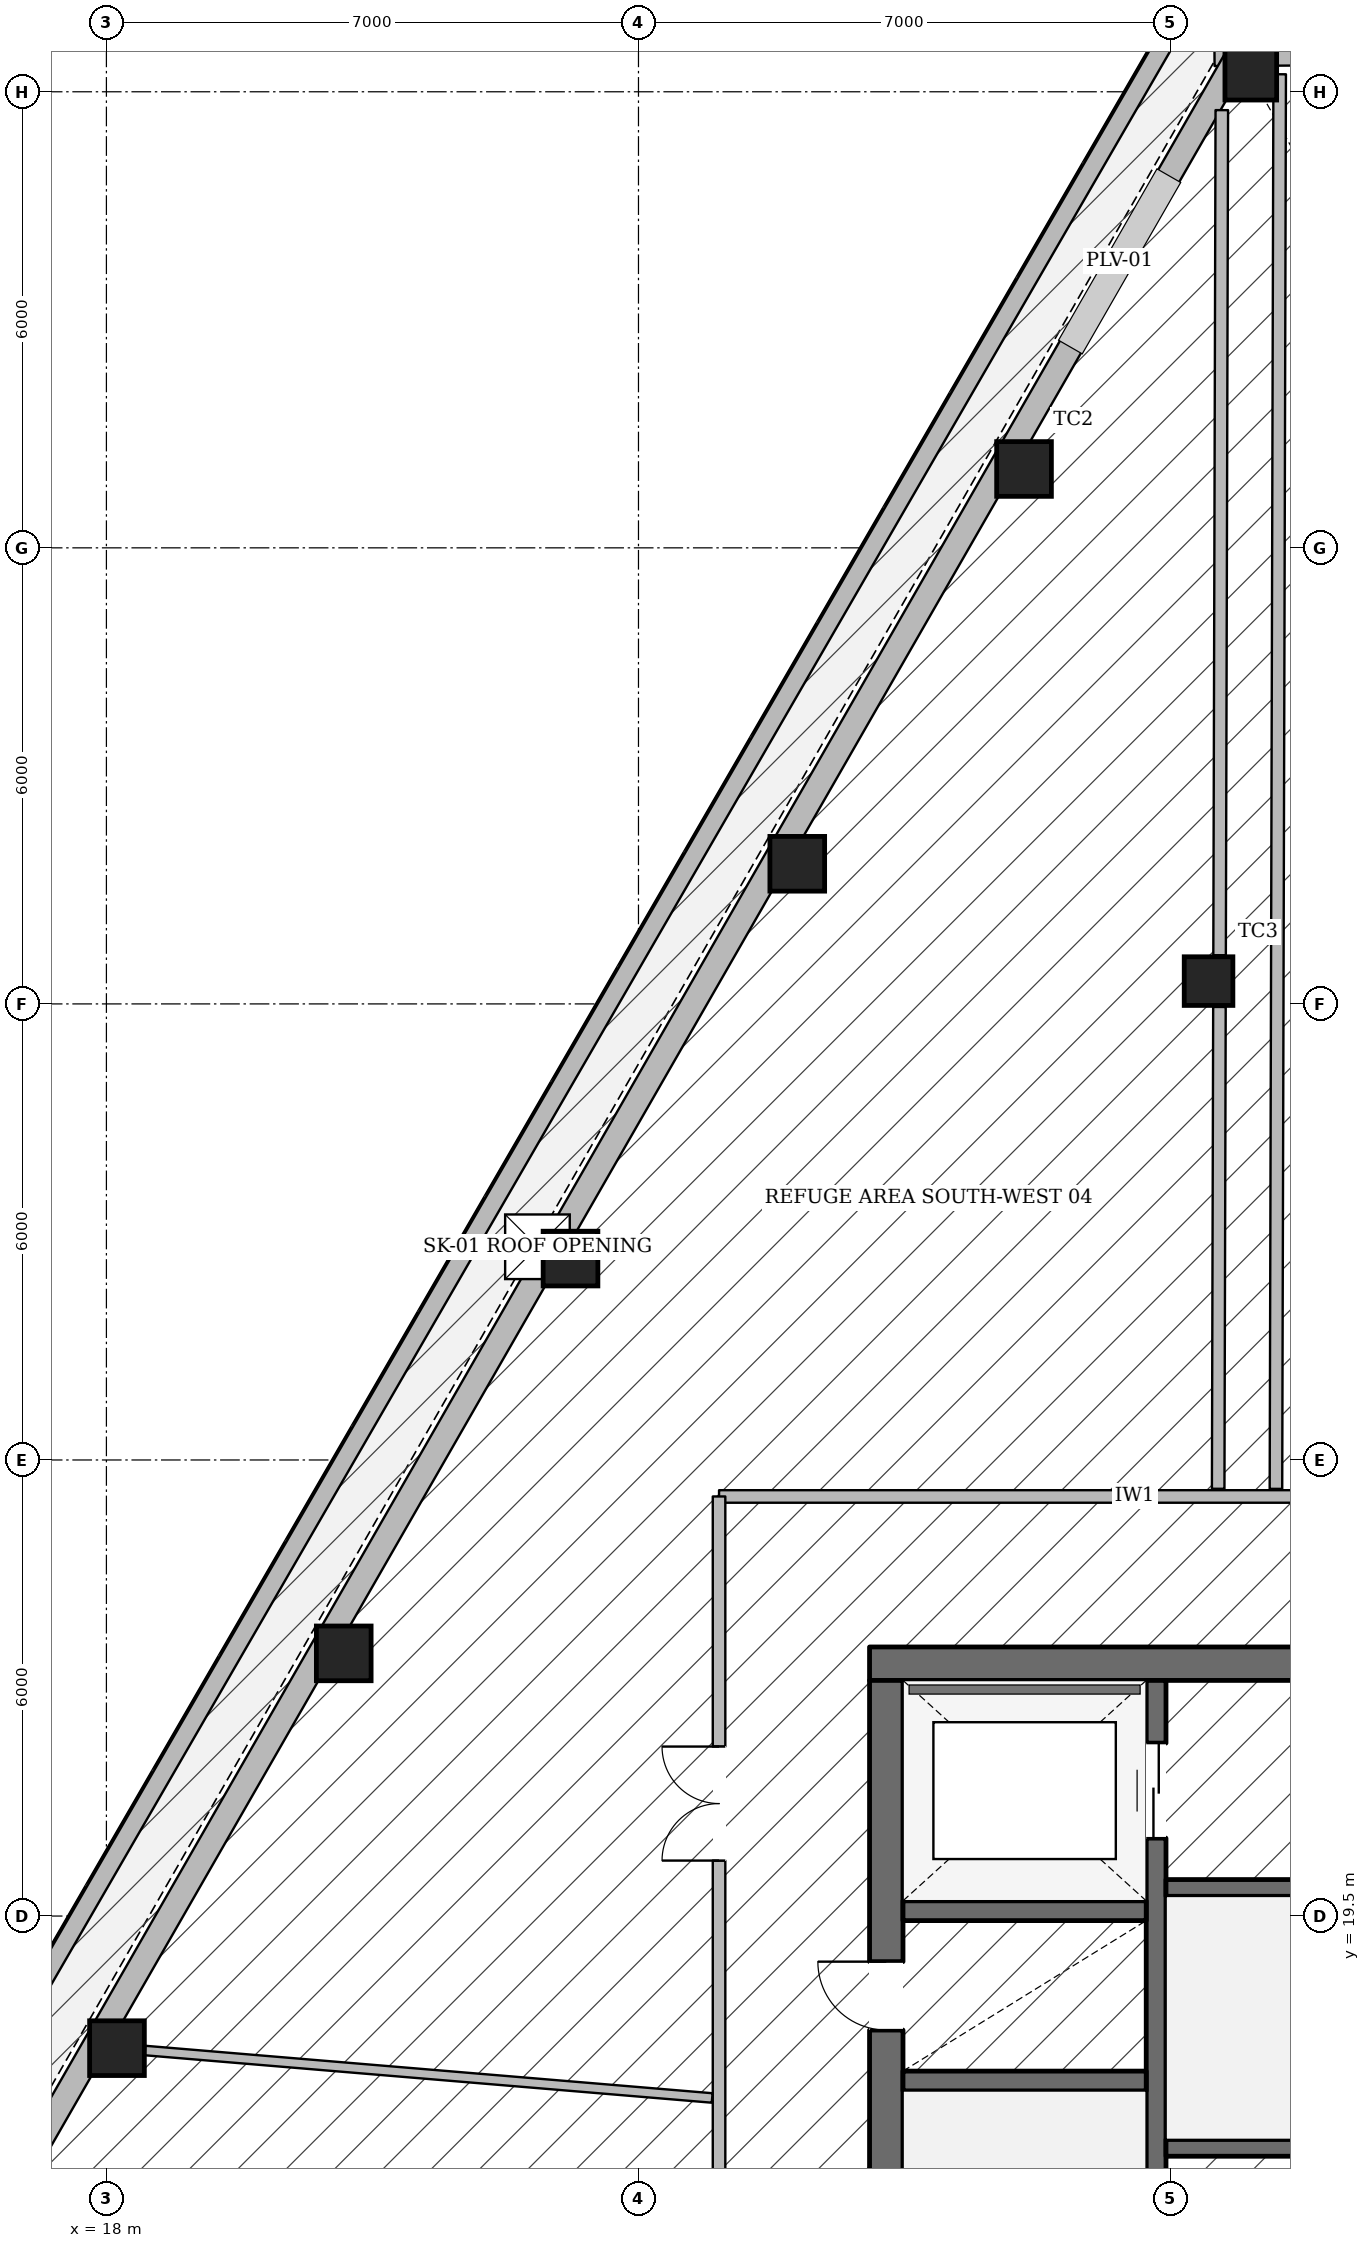
"""IFC4 building model, lengths in metres.
Left out: names, types, materials, properties, quantities, classifications, styles, units other than length and angle.
Written with IfcOpenShell. Run it as: python <this file> out.ifc"""

import sys

from ifc_helpers import new_model, si_unit, direction, frame, frame_2d, origin, origin_2d, place, context, subcontext, project, spatial, rectangle, hollow_rectangle, extrude, element, fill, save


model = new_model("IFC4")
c1 = context("Model", 3, precision=1e-05, world=origin(), true_north=direction((0.0, 1.0)))
c2 = subcontext(c1, "Body", "Model", "MODEL_VIEW")
j1 = project(units=[si_unit("LENGTHUNIT", "METRE"), si_unit("PLANEANGLEUNIT", "RADIAN")], contexts=[c1])
p1 = place(None, origin())
s1 = spatial("IfcSite", under=j1, at=p1, CompositionType="ELEMENT")
p2 = place(p1, origin())
s2 = spatial("IfcBuilding", under=s1, at=p2, CompositionType="ELEMENT")
p3 = place(p2, frame((0.0, 0.0, 154.8)))
s3 = spatial("IfcBuildingStorey", under=s2, at=p3, CompositionType="ELEMENT", Elevation=154.8)
p4 = place(p3, frame((28.04, 22.82, 0.0), z_axis=(0.0, 0.0, 1.0), x_axis=(1.0, 0.0, 0.0)))
e1 = element("IfcWall", 1, at=p4, inside=s3, PredefinedType="SOLIDWALL", context=c2, shape_type="SweptSolid", body=[
    extrude(rectangle(XDim=19.92, YDim=0.44, at=frame_2d((9.96, 0.0))), origin(), (0.0, 0.0, 1.0), 4.985),
])
p5 = place(p4, frame((6.235, 0.0, 0.0)))
e2 = element("IfcOpeningElement", 2, at=p5, cuts=e1, PredefinedType="OPENING", context=c2, shape_type="SweptSolid", body=[
    extrude(rectangle(XDim=1.05, YDim=2.15, at=frame_2d((0.525, 1.075))), frame((0.0, 0.23, 0.0), z_axis=(0.0, -1.0, 0.0), x_axis=(1.0, 0.0, 0.0)), (0.0, 0.0, 1.0), 0.46),
])
p6 = place(p4, frame((12.635, 0.0, 0.0)))
e3 = element("IfcOpeningElement", 3, at=p6, cuts=e1, PredefinedType="OPENING", context=c2, shape_type="SweptSolid", body=[
    extrude(rectangle(XDim=1.05, YDim=2.15, at=frame_2d((0.525, 1.075))), frame((0.0, 0.23, 0.0), z_axis=(0.0, -1.0, 0.0), x_axis=(1.0, 0.0, 0.0)), (0.0, 0.0, 1.0), 0.46),
])
p7 = place(p3, frame((28.26, 9.6, 0.0), z_axis=(0.0, 0.0, 1.0), x_axis=(0.0, 1.0, 0.0)))
e4 = element("IfcWall", 4, at=p7, inside=s3, PredefinedType="SOLIDWALL", context=c2, shape_type="SweptSolid", body=[
    extrude(rectangle(XDim=13.0, YDim=0.44, at=frame_2d((6.5, 0.0))), origin(), (0.0, 0.0, 1.0), 4.985),
])
p8 = place(p7, frame((0.2, 0.0, 0.0)))
e5 = element("IfcOpeningElement", 5, at=p8, cuts=e4, PredefinedType="OPENING", context=c2, shape_type="SweptSolid", body=[
    extrude(rectangle(XDim=1.1, YDim=2.15, at=frame_2d((0.55, 1.075))), frame((0.0, 0.23, 0.0), z_axis=(0.0, -1.0, 0.0), x_axis=(1.0, 0.0, 0.0)), (0.0, 0.0, 1.0), 0.46),
])
p9 = place(p7, frame((8.4, 0.0, 0.0)))
e6 = element("IfcOpeningElement", 6, at=p9, cuts=e4, PredefinedType="OPENING", context=c2, shape_type="SweptSolid", body=[
    extrude(rectangle(XDim=0.9, YDim=2.1, at=frame_2d((0.45, 1.05))), frame((0.0, 0.23, 0.0), z_axis=(0.0, -1.0, 0.0), x_axis=(1.0, 0.0, 0.0)), (0.0, 0.0, 1.0), 0.46),
])
p10 = place(p3, frame((31.81, 9.6, 0.0), z_axis=(0.0, 0.0, 1.0), x_axis=(0.0, 1.0, 0.0)))
e7 = element("IfcWall", 7, at=p10, inside=s3, PredefinedType="SHEAR", context=c2, shape_type="SweptSolid", body=[
    extrude(rectangle(XDim=13.0, YDim=0.26, at=frame_2d((6.5, 0.0))), origin(), (0.0, 0.0, 1.0), 4.985),
])
p11 = place(p10, frame((10.925, 0.0, 0.0)))
e8 = element("IfcOpeningElement", 8, at=p11, cuts=e7, PredefinedType="OPENING", context=c2, shape_type="SweptSolid", body=[
    extrude(rectangle(XDim=1.25, YDim=2.25, at=frame_2d((0.625, 1.125))), frame((0.0, 0.14, 0.0), z_axis=(0.0, -1.0, 0.0), x_axis=(1.0, 0.0, 0.0)), (0.0, 0.0, 1.0), 0.28),
])
for number, where, z_axis, x_axis in (
    (9, (28.48, 17.33, 0.0), (0.0, 0.0, 1.0), (1.0, 0.0, 0.0)),
    (10, (28.48, 19.57, 0.0), (0.0, 0.0, 1.0), (1.0, 0.0, 0.0)),
):
    element("IfcWall", number, at=place(p3, frame(where, z_axis=z_axis, x_axis=x_axis)), inside=s3, PredefinedType="SHEAR", context=c2, shape_type="SweptSolid", body=[
        extrude(rectangle(XDim=3.2, YDim=0.26, at=frame_2d((1.6, 0.0))), origin(), (0.0, 0.0, 1.0), 4.985),
    ])
p12 = place(p3, frame((31.94, 19.87, 0.0), z_axis=(0.0, 0.0, 1.0), x_axis=(1.0, 0.0, 0.0)))
e11 = element("IfcWall", 11, at=p12, inside=s3, PredefinedType="SOLIDWALL", context=c2, shape_type="SweptSolid", body=[
    extrude(rectangle(XDim=12.12, YDim=0.22, at=frame_2d((6.06, 0.0))), origin(), (0.0, 0.0, 1.0), 4.985),
])
p13 = place(p12, frame((6.3, 0.0, 0.0)))
e12 = element("IfcOpeningElement", 12, at=p13, cuts=e11, PredefinedType="OPENING", context=c2, shape_type="SweptSolid", body=[
    extrude(rectangle(XDim=1.1, YDim=2.15, at=frame_2d((0.55, 1.075))), frame((0.0, 0.12, 0.0), z_axis=(0.0, -1.0, 0.0), x_axis=(1.0, 0.0, 0.0)), (0.0, 0.0, 1.0), 0.24),
])
p14 = place(p12, frame((8.61, 0.0, 0.0)))
e13 = element("IfcOpeningElement", 13, at=p14, cuts=e11, PredefinedType="OPENING", context=c2, shape_type="SweptSolid", body=[
    extrude(rectangle(XDim=0.9, YDim=2.1, at=frame_2d((0.45, 1.05))), frame((0.0, 0.12, 0.0), z_axis=(0.0, -1.0, 0.0), x_axis=(1.0, 0.0, 0.0)), (0.0, 0.0, 1.0), 0.24),
])
p15 = place(p12, frame((10.85, 0.0, 0.0)))
e14 = element("IfcOpeningElement", 14, at=p15, cuts=e11, PredefinedType="OPENING", context=c2, shape_type="SweptSolid", body=[
    extrude(rectangle(XDim=0.9, YDim=2.1, at=frame_2d((0.45, 1.05))), frame((0.0, 0.12, 0.0), z_axis=(0.0, -1.0, 0.0), x_axis=(1.0, 0.0, 0.0)), (0.0, 0.0, 1.0), 0.24),
])
p16 = place(p3, frame((31.94, 16.45, 0.0), z_axis=(0.0, 0.0, 1.0), x_axis=(1.0, 0.0, 0.0)))
e15 = element("IfcWall", 15, at=p16, inside=s3, PredefinedType="SOLIDWALL", context=c2, shape_type="SweptSolid", body=[
    extrude(rectangle(XDim=12.12, YDim=0.22, at=frame_2d((6.06, 0.0))), origin(), (0.0, 0.0, 1.0), 4.985),
])
p17 = place(p3, frame((33.056, 43.731, 0.0), z_axis=(0.0, 0.0, 1.0), x_axis=(1.0, 0.0, 0.0)))
e16 = element("IfcColumn", 16, at=p17, inside=s3, PredefinedType="COLUMN", context=c2, shape_type="SweptSolid", body=[
    extrude(hollow_rectangle(XDim=0.68, YDim=0.68, WallThickness=0.03, at=origin_2d()), origin(), (0.0, 0.0, 1.0), 4.985),
])
for number, where, z_axis, x_axis in (
    (17, (30.073, 38.538, 0.0), (0.0, 0.0, 1.0), (1.0, 0.0, 0.0)),
    (18, (27.089, 33.344, 0.0), (0.0, 0.0, 1.0), (1.0, 0.0, 0.0)),
    (19, (24.106, 28.15, 0.0), (0.0, 0.0, 1.0), (1.0, 0.0, 0.0)),
    (20, (21.122, 22.956, 0.0), (0.0, 0.0, 1.0), (1.0, 0.0, 0.0)),
    (21, (18.139, 17.762, 0.0), (0.0, 0.0, 1.0), (1.0, 0.0, 0.0)),
):
    element("IfcColumn", number, at=place(p3, frame(where, z_axis=z_axis, x_axis=x_axis)), inside=s3, PredefinedType="COLUMN", context=c2, shape_type="SweptSolid", body=[
        extrude(hollow_rectangle(XDim=0.72, YDim=0.72, WallThickness=0.032, at=origin_2d()), origin(), (0.0, 0.0, 1.0), 4.985),
    ])
p18 = place(p3, frame((32.5, 31.8, 0.0), z_axis=(0.0, 0.0, 1.0), x_axis=(1.0, 0.0, 0.0)))
e22 = element("IfcColumn", 22, at=p18, inside=s3, PredefinedType="COLUMN", context=c2, shape_type="SweptSolid", body=[
    extrude(hollow_rectangle(XDim=0.64, YDim=0.64, WallThickness=0.028, at=origin_2d()), origin(), (0.0, 0.0, 1.0), 4.985),
])
p19 = place(p3, frame((32.578, 43.999, 0.0), z_axis=(0.0, 0.0, 1.0), x_axis=(0.999981011768, 0.006162475365, 0.0)))
e23 = element("IfcWall", 23, at=p19, inside=s3, PredefinedType="STANDARD", context=c2, shape_type="SweptSolid", body=[
    extrude(rectangle(XDim=10.736, YDim=0.32, at=frame_2d((5.368, 0.0))), origin(), (0.0, 0.0, 1.0), 3.677),
])
p20 = place(p3, frame((14.686, 12.292, 0.0), z_axis=(0.0, 0.0, 1.0), x_axis=(0.498068556708, 0.867137655057, 0.0)))
e24 = element("IfcWall", 24, at=p20, inside=s3, PredefinedType="STANDARD", context=c2, shape_type="SweptSolid", body=[
    extrude(rectangle(XDim=36.888, YDim=0.32, at=frame_2d((18.444, 0.0))), origin(), (0.0, 0.0, 1.0), 3.677),
])
p21 = place(p3, frame((32.566, 45.26, 0.0), z_axis=(0.0, 0.0, 1.0), x_axis=(-0.50091530354, -0.865496307721, 0.0)))
e25 = element("IfcWall", 25, at=p21, inside=s3, PredefinedType="PARAPET", context=c2, shape_type="SweptSolid", body=[
    extrude(rectangle(XDim=38.428, YDim=0.24, at=frame_2d((19.214, 0.0))), origin(), (0.0, 0.0, 1.0), 1.25),
])
p22 = place(p3, frame((26.06, 25.02, 0.0), z_axis=(0.0, 0.0, 1.0), x_axis=(1.0, 0.0, 0.0)))
e26 = element("IfcWall", 26, at=p22, inside=s3, PredefinedType="PARTITIONING", context=c2, shape_type="SweptSolid", body=[
    extrude(rectangle(XDim=23.88, YDim=0.165, at=frame_2d((11.94, 0.0))), origin(), (0.0, 0.0, 1.0), 4.985),
])
p23 = place(p22, frame((19.765, 0.0, 0.0)))
e27 = element("IfcOpeningElement", 27, at=p23, cuts=e26, PredefinedType="OPENING", context=c2, shape_type="SweptSolid", body=[
    extrude(rectangle(XDim=1.5, YDim=2.25, at=frame_2d((0.75, 1.125))), frame((0.0, 0.093, 0.0), z_axis=(0.0, -1.0, 0.0), x_axis=(1.0, 0.0, 0.0)), (0.0, 0.0, 1.0), 0.185),
])
p24 = place(p22, frame((11.183, 0.0, 0.0)))
e28 = element("IfcOpeningElement", 28, at=p24, cuts=e26, PredefinedType="OPENING", context=c2, shape_type="SweptSolid", body=[
    extrude(rectangle(XDim=1.5, YDim=2.25, at=frame_2d((0.75, 1.125))), frame((0.0, 0.093, 0.0), z_axis=(0.0, -1.0, 0.0), x_axis=(1.0, 0.0, 0.0)), (0.0, 0.0, 1.0), 0.185),
])
p25 = place(p3, frame((26.06, 7.18, 0.0), z_axis=(0.0, 0.0, 1.0), x_axis=(0.0, 1.0, 0.0)))
e29 = element("IfcWall", 29, at=p25, inside=s3, PredefinedType="PARTITIONING", context=c2, shape_type="SweptSolid", body=[
    extrude(rectangle(XDim=17.84, YDim=0.165, at=frame_2d((8.92, 0.0))), origin(), (0.0, 0.0, 1.0), 4.673),
])
p26 = place(p25, frame((13.05, 0.0, 0.0)))
e30 = element("IfcOpeningElement", 30, at=p26, cuts=e29, PredefinedType="OPENING", context=c2, shape_type="SweptSolid", body=[
    extrude(rectangle(XDim=1.5, YDim=2.25, at=frame_2d((0.75, 1.125))), frame((0.0, 0.093, 0.0), z_axis=(0.0, -1.0, 0.0), x_axis=(1.0, 0.0, 0.0)), (0.0, 0.0, 1.0), 0.185),
])
p27 = place(p25, frame((6.21, 0.0, 0.0)))
e31 = element("IfcOpeningElement", 31, at=p27, cuts=e29, PredefinedType="OPENING", context=c2, shape_type="SweptSolid", body=[
    extrude(rectangle(XDim=1.5, YDim=2.25, at=frame_2d((0.75, 1.125))), frame((0.0, 0.093, 0.0), z_axis=(0.0, -1.0, 0.0), x_axis=(1.0, 0.0, 0.0)), (0.0, 0.0, 1.0), 0.185),
])
p28 = place(p25, frame((1.001, 0.0, 0.0)))
e32 = element("IfcOpeningElement", 32, at=p28, cuts=e29, PredefinedType="OPENING", context=c2, shape_type="SweptSolid", body=[
    extrude(rectangle(XDim=1.5, YDim=2.25, at=frame_2d((0.75, 1.125))), frame((0.0, 0.093, 0.0), z_axis=(0.0, -1.0, 0.0), x_axis=(1.0, 0.0, 0.0)), (0.0, 0.0, 1.0), 0.185),
])
p29 = place(p3, frame((32.627, 25.121, 0.0), z_axis=(0.0, 0.0, 1.0), x_axis=(0.002619001956, 0.999996570408, 0.0)))
e33 = element("IfcWall", 33, at=p29, inside=s3, PredefinedType="PARTITIONING", context=c2, shape_type="SweptSolid", body=[
    extrude(rectangle(XDim=6.339, YDim=0.165, at=frame_2d((3.169, 0.0))), origin(), (0.0, 0.0, 1.0), 4.985),
])
p30 = place(p3, frame((32.645, 32.14, 0.0), z_axis=(0.0, 0.0, 1.0), x_axis=(0.002634979105, 0.999996528437, 0.0)))
e34 = element("IfcWall", 34, at=p30, inside=s3, PredefinedType="PARTITIONING", context=c2, shape_type="SweptSolid", body=[
    extrude(rectangle(XDim=11.118, YDim=0.165, at=frame_2d((5.559, 0.0))), origin(), (0.0, 0.0, 1.0), 3.68),
])
p31 = place(p3, frame((33.387, 25.12, 0.0), z_axis=(0.0, 0.0, 1.0), x_axis=(0.002636817196, 0.999996523591, 0.0)))
e35 = element("IfcWall", 35, at=p31, inside=s3, PredefinedType="PARTITIONING", context=c2, shape_type="SweptSolid", body=[
    extrude(rectangle(XDim=18.61, YDim=0.165, at=frame_2d((9.305, 0.0))), origin(), (0.0, 0.0, 1.0), 4.985),
])
p32 = place(p3, frame((25.969, 17.107, 0.0), z_axis=(0.0, 0.0, 1.0), x_axis=(-0.996519175933, 0.083363853067, 0.0)))
e36 = element("IfcWall", 36, at=p32, inside=s3, PredefinedType="PARTITIONING", context=c2, shape_type="SweptSolid", body=[
    extrude(rectangle(XDim=7.489, YDim=0.125, at=frame_2d((3.744, 0.0))), origin(), (0.0, 0.0, 1.0), 3.68),
])
p33 = place(p3, frame((0.0, 0.0, -0.22)))
p34 = place(p33, frame((23.671, 28.305, 0.0)))
p35 = place(p34, frame((0.0, 0.0, 0.17)))
e37 = element("IfcWindow", 37, at=p35, inside=s3, PartitioningType="SINGLE_PANEL", PredefinedType="SKYLIGHT", context=c2, shape_type="SweptSolid", body=[
    extrude(rectangle(XDim=0.85, YDim=0.85, at=origin_2d()), origin(), (0.0, 0.0, 1.0), 0.05),
])
p36 = place(p9, origin())
e38 = element("IfcDoor", 38, at=p36, inside=s3, OperationType="SINGLE_SWING_RIGHT", PredefinedType="DOOR", context=c2, shape_type="SweptSolid", body=[
    extrude(rectangle(XDim=0.9, YDim=2.1, at=frame_2d((0.45, 1.05))), frame((0.0, 0.025, 0.0), z_axis=(0.0, -1.0, 0.0), x_axis=(1.0, 0.0, 0.0)), (0.0, 0.0, 1.0), 0.05),
])
fill(e6, e38)
p37 = place(p11, origin())
e39 = element("IfcDoor", 39, at=p37, inside=s3, OperationType="DOUBLE_DOOR_SLIDING", PredefinedType="DOOR", context=c2, shape_type="SweptSolid", body=[
    extrude(rectangle(XDim=1.25, YDim=2.25, at=frame_2d((0.625, 1.125))), frame((0.0, 0.025, 0.0), z_axis=(0.0, -1.0, 0.0), x_axis=(1.0, 0.0, 0.0)), (0.0, 0.0, 1.0), 0.05),
])
fill(e8, e39)
p38 = place(p26, origin())
e40 = element("IfcDoor", 40, at=p38, inside=s3, OperationType="DOUBLE_DOOR_SINGLE_SWING", PredefinedType="DOOR", context=c2, shape_type="SweptSolid", body=[
    extrude(rectangle(XDim=1.5, YDim=2.25, at=frame_2d((0.75, 1.125))), frame((0.0, 0.025, 0.0), z_axis=(0.0, -1.0, 0.0), x_axis=(1.0, 0.0, 0.0)), (0.0, 0.0, 1.0), 0.05),
])
fill(e30, e40)
save(model, sys.argv[1])
